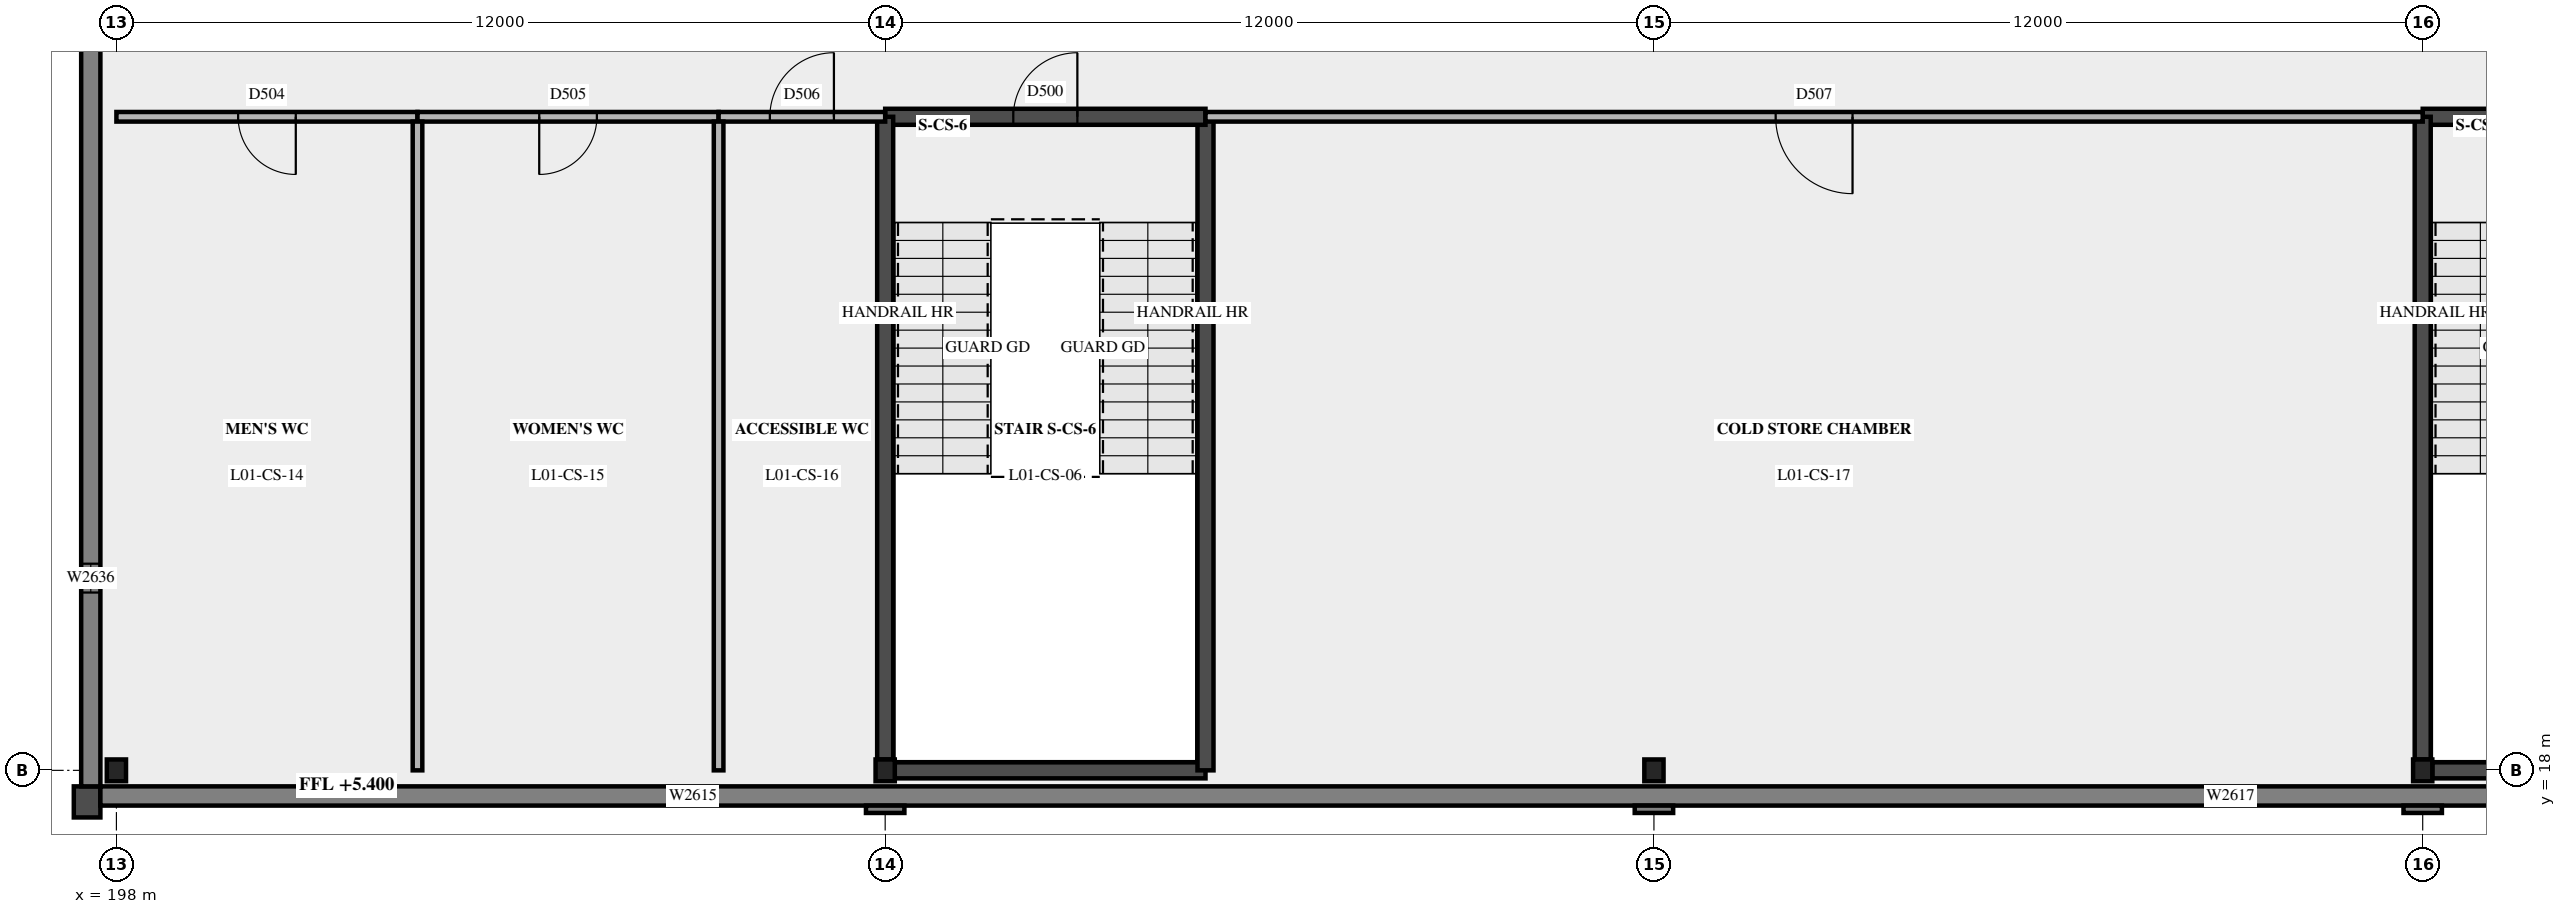
"""IFC4 building model, lengths in metres.
Left out: names, types, materials, properties, quantities, classifications, styles, units other than length and angle.
Written with IfcOpenShell. Run it as: python <this file> out.ifc"""

import sys

from ifc_helpers import new_model, si_unit, direction, frame, frame_2d, origin, origin_2d, place, context, subcontext, project, spatial, polyline, rectangle, i_section, outline, extrude, element, fill, save


model = new_model("IFC4")
c1 = context("Model", 3, precision=1e-05, world=origin(), true_north=direction((0.0, 1.0)))
c2 = subcontext(c1, "Body", "Model", "MODEL_VIEW")
j1 = project(units=[si_unit("LENGTHUNIT", "METRE"), si_unit("PLANEANGLEUNIT", "RADIAN")], contexts=[c1])
p1 = place(None, origin())
s1 = spatial("IfcSite", under=j1, at=p1, CompositionType="ELEMENT")
p2 = place(p1, origin())
s2 = spatial("IfcBuilding", under=s1, at=p2, CompositionType="ELEMENT")
p3 = place(p2, frame((0.0, 0.0, 5.4)))
s3 = spatial("IfcBuildingStorey", under=s2, at=p3, CompositionType="ELEMENT", Elevation=5.4)
for number, where, z_axis, x_axis in (
    (1, (198.0, 18.0, 0.0), (0.0, 0.0, 1.0), (1.0, 0.0, 0.0)),
    (2, (210.0, 18.0, 0.0), (0.0, 0.0, 1.0), (1.0, 0.0, 0.0)),
    (3, (222.0, 18.0, 0.0), (0.0, 0.0, 1.0), (1.0, 0.0, 0.0)),
    (4, (234.0, 18.0, 0.0), (0.0, 0.0, 1.0), (1.0, 0.0, 0.0)),
):
    element("IfcColumn", number, at=place(p3, frame(where, z_axis=z_axis, x_axis=x_axis)), inside=s3, PredefinedType="COLUMN", context=c2, shape_type="SweptSolid", body=[
        extrude(i_section(OverallWidth=0.3, OverallDepth=0.34, WebThickness=0.012, FlangeThickness=0.021, at=origin_2d()), origin(), (0.0, 0.0, 1.0), 5.4),
    ])
p4 = place(p3, frame((234.15, 18.0, 0.0), z_axis=(0.0, 0.0, 1.0), x_axis=(1.0, 0.0, 0.0)))
e5 = element("IfcWall", 5, at=p4, inside=s3, PredefinedType="SHEAR", context=c2, shape_type="SweptSolid", body=[
    extrude(rectangle(XDim=4.85, YDim=0.25, at=frame_2d((2.425, 0.0))), origin(), (0.0, 0.0, 1.0), 5.4),
])
p5 = place(p3, frame((234.0, 28.2, 0.0), z_axis=(0.0, 0.0, 1.0), x_axis=(1.0, 0.0, 0.0)))
e6 = element("IfcWall", 6, at=p5, inside=s3, PredefinedType="SHEAR", context=c2, shape_type="SweptSolid", body=[
    extrude(rectangle(XDim=5.0, YDim=0.25, at=frame_2d((2.5, 0.0))), origin(), (0.0, 0.0, 1.0), 5.4),
])
p6 = place(p5, frame((2.0, 0.0, 0.0)))
e7 = element("IfcOpeningElement", 7, at=p6, cuts=e6, PredefinedType="OPENING", context=c2, shape_type="SweptSolid", body=[
    extrude(rectangle(XDim=1.0, YDim=2.1, at=frame_2d((0.5, 1.05))), frame((0.0, 0.135, 0.0), z_axis=(0.0, -1.0, 0.0), x_axis=(1.0, 0.0, 0.0)), (0.0, 0.0, 1.0), 0.27),
])
p7 = place(p3, frame((234.0, 18.17, 0.0), z_axis=(0.0, 0.0, 1.0), x_axis=(0.0, 1.0, 0.0)))
e8 = element("IfcWall", 8, at=p7, inside=s3, PredefinedType="SHEAR", context=c2, shape_type="SweptSolid", body=[
    extrude(rectangle(XDim=10.03, YDim=0.25, at=frame_2d((5.015, 0.0))), origin(), (0.0, 0.0, 1.0), 5.4),
])
p8 = place(p3, frame((210.15, 18.0, 0.0), z_axis=(0.0, 0.0, 1.0), x_axis=(1.0, 0.0, 0.0)))
e9 = element("IfcWall", 9, at=p8, inside=s3, PredefinedType="SHEAR", context=c2, shape_type="SweptSolid", body=[
    extrude(rectangle(XDim=4.85, YDim=0.25, at=frame_2d((2.425, 0.0))), origin(), (0.0, 0.0, 1.0), 5.4),
])
p9 = place(p3, frame((215.0, 18.0, 0.0), z_axis=(0.0, 0.0, 1.0), x_axis=(0.0, 1.0, 0.0)))
e10 = element("IfcWall", 10, at=p9, inside=s3, PredefinedType="SHEAR", context=c2, shape_type="SweptSolid", body=[
    extrude(rectangle(XDim=10.2, YDim=0.25, at=frame_2d((5.1, 0.0))), origin(), (0.0, 0.0, 1.0), 5.4),
])
p10 = place(p3, frame((210.0, 28.2, 0.0), z_axis=(0.0, 0.0, 1.0), x_axis=(1.0, 0.0, 0.0)))
e11 = element("IfcWall", 11, at=p10, inside=s3, PredefinedType="SHEAR", context=c2, shape_type="SweptSolid", body=[
    extrude(rectangle(XDim=5.0, YDim=0.25, at=frame_2d((2.5, 0.0))), origin(), (0.0, 0.0, 1.0), 5.4),
])
p11 = place(p10, frame((2.0, 0.0, 0.0)))
e12 = element("IfcOpeningElement", 12, at=p11, cuts=e11, PredefinedType="OPENING", context=c2, shape_type="SweptSolid", body=[
    extrude(rectangle(XDim=1.0, YDim=2.1, at=frame_2d((0.5, 1.05))), frame((0.0, 0.135, 0.0), z_axis=(0.0, -1.0, 0.0), x_axis=(1.0, 0.0, 0.0)), (0.0, 0.0, 1.0), 0.27),
])
p12 = place(p3, frame((210.0, 18.17, 0.0), z_axis=(0.0, 0.0, 1.0), x_axis=(0.0, 1.0, 0.0)))
e13 = element("IfcWall", 13, at=p12, inside=s3, PredefinedType="SHEAR", context=c2, shape_type="SweptSolid", body=[
    extrude(rectangle(XDim=10.03, YDim=0.25, at=frame_2d((5.015, 0.0))), origin(), (0.0, 0.0, 1.0), 5.4),
])
p13 = place(p3, frame((197.75, 17.472, -0.39), z_axis=(0.0, 0.0, 1.0), x_axis=(-1.0, 0.0, 0.0)))
e14 = element("IfcWall", 14, at=p13, inside=s3, PredefinedType="SOLIDWALL", context=c2, shape_type="SweptSolid", body=[
    extrude(rectangle(XDim=0.53, YDim=0.555, at=frame_2d((0.265, 0.0))), origin(), (0.0, 0.0, 1.0), 0.13),
])
p14 = place(p3, frame((197.75, 17.438, -0.26), z_axis=(0.0, 0.0, 1.0), x_axis=(-1.0, 0.0, 0.0)))
e15 = element("IfcWall", 15, at=p14, inside=s3, PredefinedType="SOLIDWALL", context=c2, shape_type="SweptSolid", body=[
    extrude(rectangle(XDim=0.645, YDim=0.625, at=frame_2d((0.323, 0.0))), origin(), (0.0, 0.0, 1.0), 0.13),
])
p15 = place(p3, frame((197.75, 17.403, -0.13), z_axis=(0.0, 0.0, 1.0), x_axis=(-1.0, 0.0, 0.0)))
e16 = element("IfcWall", 16, at=p15, inside=s3, PredefinedType="SOLIDWALL", context=c2, shape_type="SweptSolid", body=[
    extrude(rectangle(XDim=0.76, YDim=0.695, at=frame_2d((0.38, 0.0))), origin(), (0.0, 0.0, 1.0), 0.13),
])
p16 = place(p3, frame((197.75, 17.508, 0.0), z_axis=(0.0, 0.0, 1.0), x_axis=(-1.0, 0.0, 0.0)))
e17 = element("IfcWall", 17, at=p16, inside=s3, PredefinedType="SOLIDWALL", context=c2, shape_type="SweptSolid", body=[
    extrude(rectangle(XDim=0.415, YDim=0.485, at=frame_2d((0.208, 0.0))), origin(), (0.0, 0.0, 1.0), 5.01),
])
p17 = place(p3, frame((197.75, 17.472, 5.01), z_axis=(0.0, 0.0, 1.0), x_axis=(-1.0, 0.0, 0.0)))
e18 = element("IfcWall", 18, at=p17, inside=s3, PredefinedType="SOLIDWALL", context=c2, shape_type="SweptSolid", body=[
    extrude(rectangle(XDim=0.53, YDim=0.555, at=frame_2d((0.265, 0.0))), origin(), (0.0, 0.0, 1.0), 0.13),
])
p18 = place(p3, frame((197.75, 17.438, 5.14), z_axis=(0.0, 0.0, 1.0), x_axis=(-1.0, 0.0, 0.0)))
e19 = element("IfcWall", 19, at=p18, inside=s3, PredefinedType="SOLIDWALL", context=c2, shape_type="SweptSolid", body=[
    extrude(rectangle(XDim=0.645, YDim=0.625, at=frame_2d((0.323, 0.0))), origin(), (0.0, 0.0, 1.0), 0.13),
])
p19 = place(p3, frame((197.75, 17.403, 5.27), z_axis=(0.0, 0.0, 1.0), x_axis=(-1.0, 0.0, 0.0)))
e20 = element("IfcWall", 20, at=p19, inside=s3, PredefinedType="SOLIDWALL", context=c2, shape_type="SweptSolid", body=[
    extrude(rectangle(XDim=0.76, YDim=0.695, at=frame_2d((0.38, 0.0))), origin(), (0.0, 0.0, 1.0), 0.13),
])
p20 = place(p3, frame((197.75, 17.6, 0.0), z_axis=(0.0, 0.0, 1.0), x_axis=(1.0, 0.0, 0.0)))
e21 = element("IfcWall", 21, at=p20, inside=s3, PredefinedType="SOLIDWALL", context=c2, shape_type="SweptSolid", body=[
    extrude(rectangle(XDim=84.5, YDim=0.3, at=frame_2d((42.25, 0.0))), origin(), (0.0, 0.0, 1.0), 5.4),
])
p21 = place(p20, frame((9.025, 0.0, 1.8)))
e22 = element("IfcOpeningElement", 22, at=p21, cuts=e21, PredefinedType="OPENING", context=c2, shape_type="SweptSolid", body=[
    extrude(rectangle(XDim=0.45, YDim=2.4, at=frame_2d((0.225, 1.2))), frame((0.0, 0.16, 0.0), z_axis=(0.0, -1.0, 0.0), x_axis=(1.0, 0.0, 0.0)), (0.0, 0.0, 1.0), 0.32),
])
p22 = place(p20, frame((33.025, 0.0, 1.8)))
e23 = element("IfcOpeningElement", 23, at=p22, cuts=e21, PredefinedType="OPENING", context=c2, shape_type="SweptSolid", body=[
    extrude(rectangle(XDim=0.45, YDim=2.4, at=frame_2d((0.225, 1.2))), frame((0.0, 0.16, 0.0), z_axis=(0.0, -1.0, 0.0), x_axis=(1.0, 0.0, 0.0)), (0.0, 0.0, 1.0), 0.32),
])
p23 = place(p20, frame((45.025, 0.0, 1.8)))
e24 = element("IfcOpeningElement", 24, at=p23, cuts=e21, PredefinedType="OPENING", context=c2, shape_type="SweptSolid", body=[
    extrude(rectangle(XDim=0.45, YDim=2.4, at=frame_2d((0.225, 1.2))), frame((0.0, 0.16, 0.0), z_axis=(0.0, -1.0, 0.0), x_axis=(1.0, 0.0, 0.0)), (0.0, 0.0, 1.0), 0.32),
])
p24 = place(p20, frame((57.025, 0.0, 1.8)))
e25 = element("IfcOpeningElement", 25, at=p24, cuts=e21, PredefinedType="OPENING", context=c2, shape_type="SweptSolid", body=[
    extrude(rectangle(XDim=0.45, YDim=2.4, at=frame_2d((0.225, 1.2))), frame((0.0, 0.16, 0.0), z_axis=(0.0, -1.0, 0.0), x_axis=(1.0, 0.0, 0.0)), (0.0, 0.0, 1.0), 0.32),
])
p25 = place(p20, frame((81.025, 0.0, 1.8)))
e26 = element("IfcOpeningElement", 26, at=p25, cuts=e21, PredefinedType="OPENING", context=c2, shape_type="SweptSolid", body=[
    extrude(rectangle(XDim=0.45, YDim=2.4, at=frame_2d((0.225, 1.2))), frame((0.0, 0.16, 0.0), z_axis=(0.0, -1.0, 0.0), x_axis=(1.0, 0.0, 0.0)), (0.0, 0.0, 1.0), 0.32),
])
for number, where, z_axis, x_axis in (
    (27, (209.7, 17.393, 0.0), (0.0, 0.0, 1.0), (1.0, 0.0, 0.0)),
    (28, (221.7, 17.393, 0.0), (0.0, 0.0, 1.0), (1.0, 0.0, 0.0)),
    (29, (233.7, 17.393, 0.0), (0.0, 0.0, 1.0), (1.0, 0.0, 0.0)),
):
    element("IfcWall", number, at=place(p3, frame(where, z_axis=z_axis, x_axis=x_axis)), inside=s3, PredefinedType="SOLIDWALL", context=c2, shape_type="SweptSolid", body=[
        extrude(rectangle(XDim=0.6, YDim=0.115, at=frame_2d((0.3, 0.0))), origin(), (0.0, 0.0, 1.0), 5.4),
    ])
p26 = place(p3, frame((197.6, 66.25, 0.0), z_axis=(0.0, 0.0, 1.0), x_axis=(0.0, -1.0, 0.0)))
e30 = element("IfcWall", 30, at=p26, inside=s3, PredefinedType="SOLIDWALL", context=c2, shape_type="SweptSolid", body=[
    extrude(rectangle(XDim=48.5, YDim=0.3, at=frame_2d((24.25, 0.0))), origin(), (0.0, 0.0, 1.0), 5.4),
])
p27 = place(p26, frame((9.025, 0.0, 1.8)))
e31 = element("IfcOpeningElement", 31, at=p27, cuts=e30, PredefinedType="OPENING", context=c2, shape_type="SweptSolid", body=[
    extrude(rectangle(XDim=0.45, YDim=2.4, at=frame_2d((0.225, 1.2))), frame((0.0, 0.16, 0.0), z_axis=(0.0, -1.0, 0.0), x_axis=(1.0, 0.0, 0.0)), (0.0, 0.0, 1.0), 0.32),
])
p28 = place(p26, frame((33.025, 0.0, 1.8)))
e32 = element("IfcOpeningElement", 32, at=p28, cuts=e30, PredefinedType="OPENING", context=c2, shape_type="SweptSolid", body=[
    extrude(rectangle(XDim=0.45, YDim=2.4, at=frame_2d((0.225, 1.2))), frame((0.0, 0.16, 0.0), z_axis=(0.0, -1.0, 0.0), x_axis=(1.0, 0.0, 0.0)), (0.0, 0.0, 1.0), 0.32),
])
p29 = place(p26, frame((45.025, 0.0, 1.8)))
e33 = element("IfcOpeningElement", 33, at=p29, cuts=e30, PredefinedType="OPENING", context=c2, shape_type="SweptSolid", body=[
    extrude(rectangle(XDim=0.45, YDim=2.4, at=frame_2d((0.225, 1.2))), frame((0.0, 0.16, 0.0), z_axis=(0.0, -1.0, 0.0), x_axis=(1.0, 0.0, 0.0)), (0.0, 0.0, 1.0), 0.32),
])
p30 = place(p3, frame((198.0, 28.2, 0.0), z_axis=(0.0, 0.0, 1.0), x_axis=(1.0, 0.0, 0.0)))
e34 = element("IfcWall", 34, at=p30, inside=s3, PredefinedType="PARTITIONING", context=c2, shape_type="SweptSolid", body=[
    extrude(outline(polyline([(0.0, 0.0), (4.7, 0.0), (4.7, 5.15), (2.505, 5.15), (2.5, 4.63), (2.3, 4.63), (2.295, 5.15), (0.1, 5.15), (0.095, 4.68), (0.0, 4.68), (0.0, 0.0)])), frame((0.0, 0.075, 0.0), z_axis=(0.0, -1.0, 0.0), x_axis=(1.0, 0.0, 0.0)), (0.0, 0.0, 1.0), 0.15),
])
p31 = place(p30, frame((1.9, 0.0, 0.0)))
e35 = element("IfcOpeningElement", 35, at=p31, cuts=e34, PredefinedType="OPENING", context=c2, shape_type="SweptSolid", body=[
    extrude(rectangle(XDim=0.9, YDim=2.1, at=frame_2d((0.45, 1.05))), frame((0.0, 0.085, 0.0), z_axis=(0.0, -1.0, 0.0), x_axis=(1.0, 0.0, 0.0)), (0.0, 0.0, 1.0), 0.17),
])
p32 = place(p3, frame((202.7, 28.2, 0.0), z_axis=(0.0, 0.0, 1.0), x_axis=(1.0, 0.0, 0.0)))
e36 = element("IfcWall", 36, at=p32, inside=s3, PredefinedType="PARTITIONING", context=c2, shape_type="SweptSolid", body=[
    extrude(outline(polyline([(0.0, 0.0), (4.7, 0.0), (4.7, 5.15), (2.605, 5.15), (2.6, 4.63), (2.4, 4.63), (2.395, 5.15), (0.205, 5.15), (0.2, 4.63), (0.0, 4.63), (0.0, 0.0)])), frame((0.0, 0.075, 0.0), z_axis=(0.0, -1.0, 0.0), x_axis=(1.0, 0.0, 0.0)), (0.0, 0.0, 1.0), 0.15),
])
p33 = place(p32, frame((1.9, 0.0, 0.0)))
e37 = element("IfcOpeningElement", 37, at=p33, cuts=e36, PredefinedType="OPENING", context=c2, shape_type="SweptSolid", body=[
    extrude(rectangle(XDim=0.9, YDim=2.1, at=frame_2d((0.45, 1.05))), frame((0.0, 0.085, 0.0), z_axis=(0.0, -1.0, 0.0), x_axis=(1.0, 0.0, 0.0)), (0.0, 0.0, 1.0), 0.17),
])
p34 = place(p3, frame((207.4, 28.2, 0.0), z_axis=(0.0, 0.0, 1.0), x_axis=(1.0, 0.0, 0.0)))
e38 = element("IfcWall", 38, at=p34, inside=s3, PredefinedType="PARTITIONING", context=c2, shape_type="SweptSolid", body=[
    extrude(outline(polyline([(0.0, 0.0), (2.6, 0.0), (2.6, 5.15), (0.305, 5.15), (0.3, 4.63), (0.1, 4.63), (0.095, 5.15), (0.0, 5.15), (0.0, 0.0)])), frame((0.0, 0.075, 0.0), z_axis=(0.0, -1.0, 0.0), x_axis=(1.0, 0.0, 0.0)), (0.0, 0.0, 1.0), 0.15),
])
p35 = place(p34, frame((0.8, 0.0, 0.0)))
e39 = element("IfcOpeningElement", 39, at=p35, cuts=e38, PredefinedType="OPENING", context=c2, shape_type="SweptSolid", body=[
    extrude(rectangle(XDim=1.0, YDim=2.1, at=frame_2d((0.5, 1.05))), frame((0.0, 0.085, 0.0), z_axis=(0.0, -1.0, 0.0), x_axis=(1.0, 0.0, 0.0)), (0.0, 0.0, 1.0), 0.17),
])
p36 = place(p3, frame((215.0, 28.2, 0.0), z_axis=(0.0, 0.0, 1.0), x_axis=(1.0, 0.0, 0.0)))
e40 = element("IfcWall", 40, at=p36, inside=s3, PredefinedType="PARTITIONING", context=c2, shape_type="SweptSolid", body=[
    extrude(outline(polyline([(0.0, 0.0), (19.0, 0.0), (19.0, 5.15), (16.705, 5.15), (16.7, 4.63), (16.5, 4.63), (16.495, 5.15), (14.305, 5.15), (14.3, 4.63), (14.1, 4.63), (14.095, 5.15), (11.905, 5.15), (11.9, 4.63), (11.7, 4.63), (11.695, 5.15), (9.505, 5.15), (9.5, 4.63), (9.3, 4.63), (9.295, 5.15), (7.1, 5.15), (7.095, 4.68), (6.905, 4.68), (6.9, 5.15), (4.705, 5.15), (4.7, 4.63), (4.5, 4.63), (4.495, 5.15), (2.305, 5.15), (2.3, 4.63), (2.1, 4.63), (2.095, 5.15), (0.0, 5.15), (0.0, 0.0)])), frame((0.0, 0.075, 0.0), z_axis=(0.0, -1.0, 0.0), x_axis=(1.0, 0.0, 0.0)), (0.0, 0.0, 1.0), 0.15),
])
p37 = place(p36, frame((8.9, 0.0, 0.0)))
e41 = element("IfcOpeningElement", 41, at=p37, cuts=e40, PredefinedType="OPENING", context=c2, shape_type="SweptSolid", body=[
    extrude(rectangle(XDim=1.2, YDim=2.4, at=frame_2d((0.6, 1.2))), frame((0.0, 0.085, 0.0), z_axis=(0.0, -1.0, 0.0), x_axis=(1.0, 0.0, 0.0)), (0.0, 0.0, 1.0), 0.17),
])
p38 = place(p3, frame((202.7, 18.0, 0.0), z_axis=(0.0, 0.0, 1.0), x_axis=(0.0, 1.0, 0.0)))
e42 = element("IfcWall", 42, at=p38, inside=s3, PredefinedType="PARTITIONING", context=c2, shape_type="SweptSolid", body=[
    extrude(rectangle(XDim=10.125, YDim=0.15, at=frame_2d((5.062, 0.0))), origin(), (0.0, 0.0, 1.0), 4.63),
])
p39 = place(p3, frame((207.4, 18.0, 0.0), z_axis=(0.0, 0.0, 1.0), x_axis=(0.0, 1.0, 0.0)))
e43 = element("IfcWall", 43, at=p39, inside=s3, PredefinedType="PARTITIONING", context=c2, shape_type="SweptSolid", body=[
    extrude(outline(polyline([(0.0, 0.0), (10.125, 0.0), (10.125, 5.15), (0.105, 5.15), (0.1, 4.63), (0.0, 4.63), (0.0, 0.0)])), frame((0.0, 0.075, 0.0), z_axis=(0.0, -1.0, 0.0), x_axis=(1.0, 0.0, 0.0)), (0.0, 0.0, 1.0), 0.15),
])
p40 = place(p21, origin())
e44 = element("IfcWindow", 44, at=p40, inside=s3, PartitioningType="SINGLE_PANEL", PredefinedType="WINDOW", context=c2, shape_type="SweptSolid", body=[
    extrude(rectangle(XDim=0.45, YDim=2.4, at=frame_2d((0.225, 1.2))), frame((0.0, 0.03, 0.0), z_axis=(0.0, -1.0, 0.0), x_axis=(1.0, 0.0, 0.0)), (0.0, 0.0, 1.0), 0.06),
])
fill(e22, e44)
p41 = place(p22, origin())
e45 = element("IfcWindow", 45, at=p41, inside=s3, PartitioningType="SINGLE_PANEL", PredefinedType="WINDOW", context=c2, shape_type="SweptSolid", body=[
    extrude(rectangle(XDim=0.45, YDim=2.4, at=frame_2d((0.225, 1.2))), frame((0.0, 0.03, 0.0), z_axis=(0.0, -1.0, 0.0), x_axis=(1.0, 0.0, 0.0)), (0.0, 0.0, 1.0), 0.06),
])
fill(e23, e45)
p42 = place(p29, origin())
e46 = element("IfcWindow", 46, at=p42, inside=s3, PartitioningType="SINGLE_PANEL", PredefinedType="WINDOW", context=c2, shape_type="SweptSolid", body=[
    extrude(rectangle(XDim=0.45, YDim=2.4, at=frame_2d((0.225, 1.2))), frame((0.0, 0.03, 0.0), z_axis=(0.0, -1.0, 0.0), x_axis=(1.0, 0.0, 0.0)), (0.0, 0.0, 1.0), 0.06),
])
fill(e33, e46)
p43 = place(p11, origin())
e47 = element("IfcDoor", 47, at=p43, inside=s3, OperationType="SINGLE_SWING_RIGHT", PredefinedType="DOOR", context=c2, shape_type="SweptSolid", body=[
    extrude(rectangle(XDim=1.0, YDim=2.1, at=frame_2d((0.5, 1.05))), frame((0.0, 0.025, 0.0), z_axis=(0.0, -1.0, 0.0), x_axis=(1.0, 0.0, 0.0)), (0.0, 0.0, 1.0), 0.05),
])
fill(e12, e47)
p44 = place(p31, origin())
e48 = element("IfcDoor", 48, at=p44, inside=s3, OperationType="SINGLE_SWING_LEFT", PredefinedType="DOOR", context=c2, shape_type="SweptSolid", body=[
    extrude(rectangle(XDim=0.9, YDim=2.1, at=frame_2d((0.45, 1.05))), frame((0.0, 0.025, 0.0), z_axis=(0.0, -1.0, 0.0), x_axis=(1.0, 0.0, 0.0)), (0.0, 0.0, 1.0), 0.05),
])
fill(e35, e48)
p45 = place(p33, origin())
e49 = element("IfcDoor", 49, at=p45, inside=s3, OperationType="SINGLE_SWING_RIGHT", PredefinedType="DOOR", context=c2, shape_type="SweptSolid", body=[
    extrude(rectangle(XDim=0.9, YDim=2.1, at=frame_2d((0.45, 1.05))), frame((0.0, 0.025, 0.0), z_axis=(0.0, -1.0, 0.0), x_axis=(1.0, 0.0, 0.0)), (0.0, 0.0, 1.0), 0.05),
])
fill(e37, e49)
p46 = place(p35, origin())
e50 = element("IfcDoor", 50, at=p46, inside=s3, OperationType="SINGLE_SWING_RIGHT", PredefinedType="DOOR", context=c2, shape_type="SweptSolid", body=[
    extrude(rectangle(XDim=1.0, YDim=2.1, at=frame_2d((0.5, 1.05))), frame((0.0, 0.025, 0.0), z_axis=(0.0, -1.0, 0.0), x_axis=(1.0, 0.0, 0.0)), (0.0, 0.0, 1.0), 0.05),
])
fill(e39, e50)
p47 = place(p37, origin())
e51 = element("IfcDoor", 51, at=p47, inside=s3, OperationType="SINGLE_SWING_LEFT", PredefinedType="DOOR", context=c2, shape_type="SweptSolid", body=[
    extrude(rectangle(XDim=1.2, YDim=2.4, at=frame_2d((0.6, 1.2))), frame((0.0, 0.025, 0.0), z_axis=(0.0, -1.0, 0.0), x_axis=(1.0, 0.0, 0.0)), (0.0, 0.0, 1.0), 0.05),
])
fill(e41, e51)
save(model, sys.argv[1])
